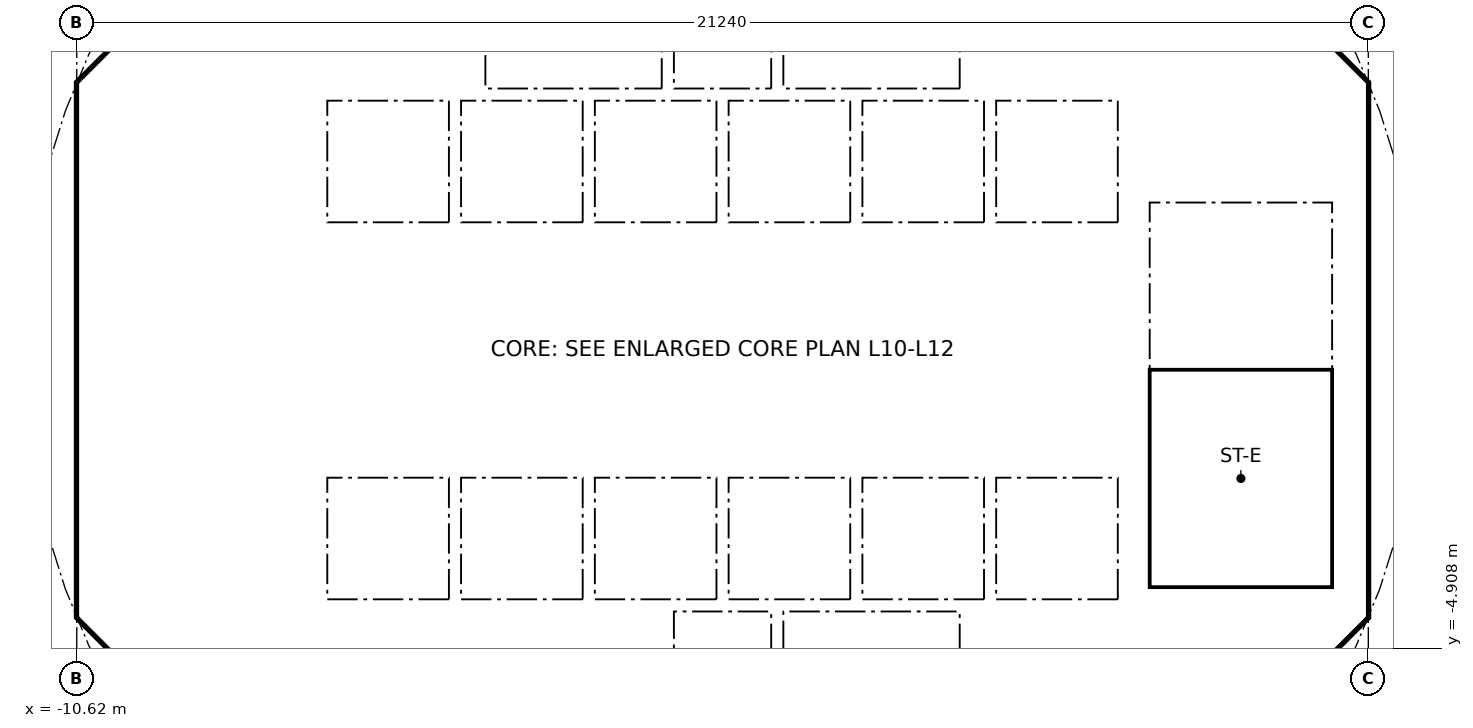
"""IFC4 building model, lengths in metres.
Left out: names, types, materials, properties, quantities, classifications, styles, units other than length and angle.
Written with IfcOpenShell. Run it as: python <this file> out.ifc"""

import sys

from ifc_helpers import new_model, si_unit, direction, frame, frame_2d, origin, place, context, subcontext, project, spatial, polyline, rectangle, outline, extrude, element, fill, save


model = new_model("IFC4")
c1 = context("Model", 3, precision=1e-05, world=origin(), true_north=direction((0.0, 1.0)))
c2 = subcontext(c1, "Body", "Model", "MODEL_VIEW")
j1 = project(units=[si_unit("LENGTHUNIT", "METRE"), si_unit("PLANEANGLEUNIT", "RADIAN")], contexts=[c1])
p1 = place(None, origin())
s1 = spatial("IfcSite", under=j1, at=p1, CompositionType="ELEMENT")
p2 = place(p1, origin())
s2 = spatial("IfcBuilding", under=s1, at=p2, CompositionType="ELEMENT")
p3 = place(p2, frame((0.0, 0.0, 52.9)))
s3 = spatial("IfcBuildingStorey", under=s2, at=p3, CompositionType="ELEMENT", Elevation=52.9)
p4 = place(p3, frame((9.988, 4.613, 0.0), z_axis=(0.0, 0.0, 1.0), x_axis=(-0.707106781187, 0.707106781187, 0.0)))
e1 = element("IfcWall", 1, at=p4, inside=s3, PredefinedType="SHEAR", context=c2, shape_type="SweptSolid", body=[
    extrude(rectangle(XDim=7.602, YDim=0.6, at=frame_2d((3.801, 0.0))), origin(), (0.0, 0.0, 1.0), 3.44),
])
p5 = place(p4, frame((3.201, 0.0, 0.0)))
e2 = element("IfcOpeningElement", 2, at=p5, cuts=e1, PredefinedType="OPENING", context=c2, shape_type="SweptSolid", body=[
    extrude(rectangle(XDim=1.2, YDim=2.1, at=frame_2d((0.6, 1.05))), frame((0.0, 0.31, 0.0), z_axis=(0.0, -1.0, 0.0), x_axis=(1.0, 0.0, 0.0)), (0.0, 0.0, 1.0), 0.62),
])
p6 = place(p3, frame((-4.613, 9.988, 0.0), z_axis=(0.0, 0.0, 1.0), x_axis=(-0.707106781187, -0.707106781187, 0.0)))
e3 = element("IfcWall", 3, at=p6, inside=s3, PredefinedType="SHEAR", context=c2, shape_type="SweptSolid", body=[
    extrude(rectangle(XDim=7.602, YDim=0.6, at=frame_2d((3.801, 0.0))), origin(), (0.0, 0.0, 1.0), 3.44),
])
p7 = place(p6, frame((0.351, 0.0, 0.0)))
e4 = element("IfcOpeningElement", 4, at=p7, cuts=e3, PredefinedType="OPENING", context=c2, shape_type="SweptSolid", body=[
    extrude(rectangle(XDim=1.1, YDim=2.1, at=frame_2d((0.55, 1.05))), frame((0.0, 0.31, 0.0), z_axis=(0.0, -1.0, 0.0), x_axis=(1.0, 0.0, 0.0)), (0.0, 0.0, 1.0), 0.62),
])
p8 = place(p3, frame((-10.325, 3.801, 0.0), z_axis=(0.0, 0.0, 1.0), x_axis=(0.0, -1.0, 0.0)))
e5 = element("IfcWall", 5, at=p8, inside=s3, PredefinedType="SHEAR", context=c2, shape_type="SweptSolid", body=[
    extrude(rectangle(XDim=7.602, YDim=0.6, at=frame_2d((3.801, 0.0))), origin(), (0.0, 0.0, 1.0), 3.44),
])
p9 = place(p8, frame((0.651, 0.0, 0.0)))
e6 = element("IfcOpeningElement", 6, at=p9, cuts=e5, PredefinedType="OPENING", context=c2, shape_type="SweptSolid", body=[
    extrude(rectangle(XDim=1.5, YDim=2.1, at=frame_2d((0.75, 1.05))), frame((0.0, 0.31, 0.0), z_axis=(0.0, -1.0, 0.0), x_axis=(1.0, 0.0, 0.0)), (0.0, 0.0, 1.0), 0.62),
])
p10 = place(p8, frame((5.451, 0.0, 0.0)))
e7 = element("IfcOpeningElement", 7, at=p10, cuts=e5, PredefinedType="OPENING", context=c2, shape_type="SweptSolid", body=[
    extrude(rectangle(XDim=1.5, YDim=2.1, at=frame_2d((0.75, 1.05))), frame((0.0, 0.31, 0.0), z_axis=(0.0, -1.0, 0.0), x_axis=(1.0, 0.0, 0.0)), (0.0, 0.0, 1.0), 0.62),
])
p11 = place(p3, frame((-9.988, -4.613, 0.0), z_axis=(0.0, 0.0, 1.0), x_axis=(0.707106781187, -0.707106781187, 0.0)))
e8 = element("IfcWall", 8, at=p11, inside=s3, PredefinedType="SHEAR", context=c2, shape_type="SweptSolid", body=[
    extrude(rectangle(XDim=7.602, YDim=0.6, at=frame_2d((3.801, 0.0))), origin(), (0.0, 0.0, 1.0), 3.44),
])
p12 = place(p11, frame((6.151, 0.0, 0.0)))
e9 = element("IfcOpeningElement", 9, at=p12, cuts=e8, PredefinedType="OPENING", context=c2, shape_type="SweptSolid", body=[
    extrude(rectangle(XDim=1.1, YDim=2.1, at=frame_2d((0.55, 1.05))), frame((0.0, 0.31, 0.0), z_axis=(0.0, -1.0, 0.0), x_axis=(1.0, 0.0, 0.0)), (0.0, 0.0, 1.0), 0.62),
])
p13 = place(p3, frame((4.613, -9.988, 0.0), z_axis=(0.0, 0.0, 1.0), x_axis=(0.707106781187, 0.707106781187, 0.0)))
e10 = element("IfcWall", 10, at=p13, inside=s3, PredefinedType="SHEAR", context=c2, shape_type="SweptSolid", body=[
    extrude(rectangle(XDim=7.602, YDim=0.6, at=frame_2d((3.801, 0.0))), origin(), (0.0, 0.0, 1.0), 3.44),
])
p14 = place(p13, frame((3.201, 0.0, 0.0)))
e11 = element("IfcOpeningElement", 11, at=p14, cuts=e10, PredefinedType="OPENING", context=c2, shape_type="SweptSolid", body=[
    extrude(rectangle(XDim=1.2, YDim=2.1, at=frame_2d((0.6, 1.05))), frame((0.0, 0.31, 0.0), z_axis=(0.0, -1.0, 0.0), x_axis=(1.0, 0.0, 0.0)), (0.0, 0.0, 1.0), 0.62),
])
p15 = place(p3, frame((-5.8, 4.3, 0.0), z_axis=(0.0, 0.0, 1.0), x_axis=(0.0, 1.0, 0.0)))
e12 = element("IfcWall", 12, at=p15, inside=s3, PredefinedType="PARTITIONING", context=c2, shape_type="SweptSolid", body=[
    extrude(rectangle(XDim=3.927, YDim=0.15, at=frame_2d((1.963, 0.0))), origin(), (0.0, 0.0, 1.0), 3.44),
])
p16 = place(p15, frame((1.551, 0.0, 0.0)))
e13 = element("IfcOpeningElement", 13, at=p16, cuts=e12, PredefinedType="OPENING", context=c2, shape_type="SweptSolid", body=[
    extrude(rectangle(XDim=0.9, YDim=2.1, at=frame_2d((0.45, 1.05))), frame((0.0, 0.085, 0.0), z_axis=(0.0, -1.0, 0.0), x_axis=(1.0, 0.0, 0.0)), (0.0, 0.0, 1.0), 0.17),
])
p17 = place(p3, frame((4.0, 4.3, 0.0), z_axis=(0.0, 0.0, 1.0), x_axis=(0.0, 1.0, 0.0)))
e14 = element("IfcWall", 14, at=p17, inside=s3, PredefinedType="SOLIDWALL", context=c2, shape_type="SweptSolid", body=[
    extrude(rectangle(XDim=2.2, YDim=0.2, at=frame_2d((1.1, 0.0))), origin(), (0.0, 0.0, 1.0), 3.44),
])
p18 = place(p17, frame((0.55, 0.0, 0.0)))
e15 = element("IfcOpeningElement", 15, at=p18, cuts=e14, PredefinedType="OPENING", context=c2, shape_type="SweptSolid", body=[
    extrude(rectangle(XDim=1.1, YDim=2.1, at=frame_2d((0.55, 1.05))), frame((0.0, 0.11, 0.0), z_axis=(0.0, -1.0, 0.0), x_axis=(1.0, 0.0, 0.0)), (0.0, 0.0, 1.0), 0.22),
])
p19 = place(p3, frame((-4.0, 4.3, 0.0), z_axis=(0.0, 0.0, 1.0), x_axis=(0.0, 1.0, 0.0)))
e16 = element("IfcWall", 16, at=p19, inside=s3, PredefinedType="SOLIDWALL", context=c2, shape_type="SweptSolid", body=[
    extrude(rectangle(XDim=2.2, YDim=0.2, at=frame_2d((1.1, 0.0))), origin(), (0.0, 0.0, 1.0), 3.44),
])
p20 = place(p19, frame((0.55, 0.0, 0.0)))
e17 = element("IfcOpeningElement", 17, at=p20, cuts=e16, PredefinedType="OPENING", context=c2, shape_type="SweptSolid", body=[
    extrude(rectangle(XDim=1.1, YDim=2.1, at=frame_2d((0.55, 1.05))), frame((0.0, 0.11, 0.0), z_axis=(0.0, -1.0, 0.0), x_axis=(1.0, 0.0, 0.0)), (0.0, 0.0, 1.0), 0.22),
])
p21 = place(p3, frame((-6.7, 2.0, 0.0), z_axis=(0.0, 0.0, 1.0), x_axis=(1.0, 0.0, 0.0)))
e18 = element("IfcWall", 18, at=p21, inside=s3, PredefinedType="SOLIDWALL", context=c2, shape_type="SweptSolid", body=[
    extrude(rectangle(XDim=13.4, YDim=0.2, at=frame_2d((6.7, 0.0))), origin(), (0.0, 0.0, 1.0), 3.44),
])
p22 = place(p21, frame((0.65, 0.0, 0.0)))
e19 = element("IfcOpeningElement", 19, at=p22, cuts=e18, PredefinedType="OPENING", context=c2, shape_type="SweptSolid", body=[
    extrude(rectangle(XDim=1.1, YDim=2.1, at=frame_2d((0.55, 1.05))), frame((0.0, 0.11, 0.0), z_axis=(0.0, -1.0, 0.0), x_axis=(1.0, 0.0, 0.0)), (0.0, 0.0, 1.0), 0.22),
])
p23 = place(p21, frame((2.85, 0.0, 0.0)))
e20 = element("IfcOpeningElement", 20, at=p23, cuts=e18, PredefinedType="OPENING", context=c2, shape_type="SweptSolid", body=[
    extrude(rectangle(XDim=1.1, YDim=2.1, at=frame_2d((0.55, 1.05))), frame((0.0, 0.11, 0.0), z_axis=(0.0, -1.0, 0.0), x_axis=(1.0, 0.0, 0.0)), (0.0, 0.0, 1.0), 0.22),
])
p24 = place(p21, frame((5.05, 0.0, 0.0)))
e21 = element("IfcOpeningElement", 21, at=p24, cuts=e18, PredefinedType="OPENING", context=c2, shape_type="SweptSolid", body=[
    extrude(rectangle(XDim=1.1, YDim=2.1, at=frame_2d((0.55, 1.05))), frame((0.0, 0.11, 0.0), z_axis=(0.0, -1.0, 0.0), x_axis=(1.0, 0.0, 0.0)), (0.0, 0.0, 1.0), 0.22),
])
p25 = place(p3, frame((6.7, 4.0, 0.0), z_axis=(0.0, 0.0, 1.0), x_axis=(1.0, 0.0, 0.0)))
e22 = element("IfcWall", 22, at=p25, inside=s3, PredefinedType="SOLIDWALL", context=c2, shape_type="SweptSolid", body=[
    extrude(rectangle(XDim=3.325, YDim=0.2, at=frame_2d((1.662, 0.0))), origin(), (0.0, 0.0, 1.0), 3.44),
])
p26 = place(p25, frame((1.25, 0.0, 0.0)))
e23 = element("IfcOpeningElement", 23, at=p26, cuts=e22, PredefinedType="OPENING", context=c2, shape_type="SweptSolid", body=[
    extrude(rectangle(XDim=1.1, YDim=2.1, at=frame_2d((0.55, 1.05))), frame((0.0, 0.11, 0.0), z_axis=(0.0, -1.0, 0.0), x_axis=(1.0, 0.0, 0.0)), (0.0, 0.0, 1.0), 0.22),
])
p27 = place(p3, frame((-6.2, -7.827, 0.0), z_axis=(0.0, 0.0, 1.0), x_axis=(0.0, 1.0, 0.0)))
e24 = element("IfcWall", 24, at=p27, inside=s3, PredefinedType="PARTITIONING", context=c2, shape_type="SweptSolid", body=[
    extrude(rectangle(XDim=3.527, YDim=0.15, at=frame_2d((1.763, 0.0))), origin(), (0.0, 0.0, 1.0), 3.44),
])
p28 = place(p27, frame((1.276, 0.0, 0.0)))
e25 = element("IfcOpeningElement", 25, at=p28, cuts=e24, PredefinedType="OPENING", context=c2, shape_type="SweptSolid", body=[
    extrude(rectangle(XDim=0.9, YDim=2.1, at=frame_2d((0.45, 1.05))), frame((0.0, 0.085, 0.0), z_axis=(0.0, -1.0, 0.0), x_axis=(1.0, 0.0, 0.0)), (0.0, 0.0, 1.0), 0.17),
])
p29 = place(p3, frame((4.0, -6.5, 0.0), z_axis=(0.0, 0.0, 1.0), x_axis=(0.0, 1.0, 0.0)))
e26 = element("IfcWall", 26, at=p29, inside=s3, PredefinedType="SOLIDWALL", context=c2, shape_type="SweptSolid", body=[
    extrude(rectangle(XDim=2.2, YDim=0.2, at=frame_2d((1.1, 0.0))), origin(), (0.0, 0.0, 1.0), 3.44),
])
p30 = place(p29, frame((0.55, 0.0, 0.0)))
e27 = element("IfcOpeningElement", 27, at=p30, cuts=e26, PredefinedType="OPENING", context=c2, shape_type="SweptSolid", body=[
    extrude(rectangle(XDim=1.1, YDim=2.1, at=frame_2d((0.55, 1.05))), frame((0.0, 0.11, 0.0), z_axis=(0.0, -1.0, 0.0), x_axis=(1.0, 0.0, 0.0)), (0.0, 0.0, 1.0), 0.22),
])
p31 = place(p3, frame((-4.0, -6.5, 0.0), z_axis=(0.0, 0.0, 1.0), x_axis=(0.0, 1.0, 0.0)))
e28 = element("IfcWall", 28, at=p31, inside=s3, PredefinedType="SOLIDWALL", context=c2, shape_type="SweptSolid", body=[
    extrude(rectangle(XDim=2.2, YDim=0.2, at=frame_2d((1.1, 0.0))), origin(), (0.0, 0.0, 1.0), 3.44),
])
p32 = place(p31, frame((0.65, 0.0, 0.0)))
e29 = element("IfcOpeningElement", 29, at=p32, cuts=e28, PredefinedType="OPENING", context=c2, shape_type="SweptSolid", body=[
    extrude(rectangle(XDim=0.9, YDim=2.1, at=frame_2d((0.45, 1.05))), frame((0.0, 0.11, 0.0), z_axis=(0.0, -1.0, 0.0), x_axis=(1.0, 0.0, 0.0)), (0.0, 0.0, 1.0), 0.22),
])
p33 = place(p3, frame((-6.7, -2.0, 0.0), z_axis=(0.0, 0.0, 1.0), x_axis=(1.0, 0.0, 0.0)))
e30 = element("IfcWall", 30, at=p33, inside=s3, PredefinedType="SOLIDWALL", context=c2, shape_type="SweptSolid", body=[
    extrude(rectangle(XDim=13.4, YDim=0.2, at=frame_2d((6.7, 0.0))), origin(), (0.0, 0.0, 1.0), 3.44),
])
p34 = place(p33, frame((0.65, 0.0, 0.0)))
e31 = element("IfcOpeningElement", 31, at=p34, cuts=e30, PredefinedType="OPENING", context=c2, shape_type="SweptSolid", body=[
    extrude(rectangle(XDim=1.1, YDim=2.1, at=frame_2d((0.55, 1.05))), frame((0.0, 0.11, 0.0), z_axis=(0.0, -1.0, 0.0), x_axis=(1.0, 0.0, 0.0)), (0.0, 0.0, 1.0), 0.22),
])
p35 = place(p33, frame((2.85, 0.0, 0.0)))
e32 = element("IfcOpeningElement", 32, at=p35, cuts=e30, PredefinedType="OPENING", context=c2, shape_type="SweptSolid", body=[
    extrude(rectangle(XDim=1.1, YDim=2.1, at=frame_2d((0.55, 1.05))), frame((0.0, 0.11, 0.0), z_axis=(0.0, -1.0, 0.0), x_axis=(1.0, 0.0, 0.0)), (0.0, 0.0, 1.0), 0.22),
])
p36 = place(p3, origin())
e33 = element("IfcWall", 33, at=p36, inside=s3, PredefinedType="SHEAR", context=c2, shape_type="SweptSolid", body=[
    extrude(outline(polyline([(-10.625, -3.801), (-10.025, -3.801), (-10.025, -4.152), (-9.776, -4.401), (-10.2, -4.825), (-10.625, -4.401), (-10.625, -3.801)])), origin(), (0.0, 0.0, 1.0), 3.44),
])
p37 = place(p3, origin())
e34 = element("IfcWall", 34, at=p37, inside=s3, PredefinedType="SHEAR", context=c2, shape_type="SweptSolid", body=[
    extrude(outline(polyline([(-10.2, 4.825), (-9.776, 4.401), (-10.025, 4.152), (-10.025, 3.801), (-10.625, 3.801), (-10.625, 4.401), (-10.2, 4.825)])), origin(), (0.0, 0.0, 1.0), 3.44),
])
p38 = place(p3, origin())
e35 = element("IfcWall", 35, at=p38, inside=s3, PredefinedType="SHEAR", context=c2, shape_type="SweptSolid", body=[
    extrude(outline(polyline([(9.776, -4.401), (10.025, -4.152), (10.025, -3.801), (10.025, 4.152), (9.776, 4.401), (10.2, 4.825), (10.625, 4.401), (10.625, -4.401), (10.2, -4.825), (9.776, -4.401)])), origin(), (0.0, 0.0, 1.0), 3.44),
])
for number, where, z_axis, x_axis in (
    (36, (-0.9, -6.5, 0.0), (0.0, 0.0, 1.0), (0.0, 1.0, 0.0)),
    (37, (0.9, -6.5, 0.0), (0.0, 0.0, 1.0), (0.0, 1.0, 0.0)),
):
    element("IfcWall", number, at=place(p3, frame(where, z_axis=z_axis, x_axis=x_axis)), inside=s3, PredefinedType="SOLIDWALL", context=c2, shape_type="SweptSolid", body=[
        extrude(rectangle(XDim=2.2, YDim=0.2, at=frame_2d((1.1, 0.0))), origin(), (0.0, 0.0, 1.0), 3.44),
    ])
p39 = place(p3, origin())
e38 = element("IfcWall", 38, at=p39, inside=s3, PredefinedType="SOLIDWALL", context=c2, shape_type="SweptSolid", body=[
    extrude(outline(polyline([(-6.7, -2.1), (-6.5, -2.1), (-6.5, -4.1), (-4.5, -4.1), (-4.5, -2.1), (-4.3, -2.1), (-4.3, -4.1), (-2.3, -4.1), (-2.3, -2.1), (-2.1, -2.1), (-2.1, -4.1), (-0.1, -4.1), (-0.1, -2.1), (0.1, -2.1), (0.1, -4.1), (2.1, -4.1), (2.1, -2.1), (2.3, -2.1), (2.3, -4.1), (4.3, -4.1), (4.3, -2.1), (4.5, -2.1), (4.5, -4.1), (6.5, -4.1), (6.5, -2.1), (6.7, -2.1), (6.7, -4.3), (-6.7, -4.3), (-6.7, -2.1)])), origin(), (0.0, 0.0, 1.0), 3.44),
])
for number, where, z_axis, x_axis in (
    (39, (-0.9, 4.3, 0.0), (0.0, 0.0, 1.0), (0.0, 1.0, 0.0)),
    (40, (0.9, 4.3, 0.0), (0.0, 0.0, 1.0), (0.0, 1.0, 0.0)),
):
    element("IfcWall", number, at=place(p3, frame(where, z_axis=z_axis, x_axis=x_axis)), inside=s3, PredefinedType="SOLIDWALL", context=c2, shape_type="SweptSolid", body=[
        extrude(rectangle(XDim=2.2, YDim=0.2, at=frame_2d((1.1, 0.0))), origin(), (0.0, 0.0, 1.0), 3.44),
    ])
p40 = place(p3, origin())
e41 = element("IfcWall", 41, at=p40, inside=s3, PredefinedType="SOLIDWALL", context=c2, shape_type="SweptSolid", body=[
    extrude(outline(polyline([(-6.5, 2.1), (-6.7, 2.1), (-6.7, 4.3), (6.7, 4.3), (6.7, 2.1), (6.5, 2.1), (6.5, 4.1), (4.5, 4.1), (4.5, 2.1), (4.3, 2.1), (4.3, 4.1), (2.3, 4.1), (2.3, 2.1), (2.1, 2.1), (2.1, 4.1), (0.1, 4.1), (0.1, 2.1), (-0.1, 2.1), (-0.1, 4.1), (-2.1, 4.1), (-2.1, 2.1), (-2.3, 2.1), (-2.3, 4.1), (-4.3, 4.1), (-4.3, 2.1), (-4.5, 2.1), (-4.5, 4.1), (-6.5, 4.1), (-6.5, 2.1)])), origin(), (0.0, 0.0, 1.0), 3.44),
])
for number, where, z_axis, x_axis in (
    (42, (-10.025, -4.0, 0.0), (0.0, 0.0, 1.0), (1.0, 0.0, 0.0)),
    (43, (-10.025, 4.0, 0.0), (0.0, 0.0, 1.0), (1.0, 0.0, 0.0)),
):
    element("IfcWall", number, at=place(p3, frame(where, z_axis=z_axis, x_axis=x_axis)), inside=s3, PredefinedType="PARTITIONING", context=c2, shape_type="SweptSolid", body=[
        extrude(rectangle(XDim=3.325, YDim=0.2, at=frame_2d((1.662, 0.0))), origin(), (0.0, 0.0, 1.0), 3.44),
    ])
p41 = place(p3, origin())
e44 = element("IfcWall", 44, at=p41, inside=s3, PredefinedType="SOLIDWALL", context=c2, shape_type="SweptSolid", body=[
    extrude(outline(polyline([(7.025, -3.9), (6.7, -3.9), (6.7, 3.9), (7.025, 3.9), (7.025, -3.9)])), origin(), (0.0, 0.0, 1.0), 3.44),
])
p42 = place(p3, origin())
e45 = element("IfcWall", 45, at=p42, inside=s3, PredefinedType="SOLIDWALL", context=c2, shape_type="SweptSolid", body=[
    extrude(outline(polyline([(10.025, -4.1), (6.7, -4.1), (6.7, -3.9), (10.025, -3.9), (10.025, -4.1)])), origin(), (0.0, 0.0, 1.0), 3.44),
])
p43 = place(p22, origin())
e46 = element("IfcDoor", 46, at=p43, inside=s3, OperationType="DOUBLE_DOOR_SLIDING", PredefinedType="DOOR", context=c2, shape_type="SweptSolid", body=[
    extrude(rectangle(XDim=1.1, YDim=2.1, at=frame_2d((0.55, 1.05))), frame((0.0, 0.025, 0.0), z_axis=(0.0, -1.0, 0.0), x_axis=(1.0, 0.0, 0.0)), (0.0, 0.0, 1.0), 0.05),
])
fill(e19, e46)
p44 = place(p23, origin())
e47 = element("IfcDoor", 47, at=p44, inside=s3, OperationType="DOUBLE_DOOR_SLIDING", PredefinedType="DOOR", context=c2, shape_type="SweptSolid", body=[
    extrude(rectangle(XDim=1.1, YDim=2.1, at=frame_2d((0.55, 1.05))), frame((0.0, 0.025, 0.0), z_axis=(0.0, -1.0, 0.0), x_axis=(1.0, 0.0, 0.0)), (0.0, 0.0, 1.0), 0.05),
])
fill(e20, e47)
p45 = place(p24, origin())
e48 = element("IfcDoor", 48, at=p45, inside=s3, OperationType="DOUBLE_DOOR_SLIDING", PredefinedType="DOOR", context=c2, shape_type="SweptSolid", body=[
    extrude(rectangle(XDim=1.1, YDim=2.1, at=frame_2d((0.55, 1.05))), frame((0.0, 0.025, 0.0), z_axis=(0.0, -1.0, 0.0), x_axis=(1.0, 0.0, 0.0)), (0.0, 0.0, 1.0), 0.05),
])
fill(e21, e48)
p46 = place(p34, origin())
e49 = element("IfcDoor", 49, at=p46, inside=s3, OperationType="DOUBLE_DOOR_SLIDING", PredefinedType="DOOR", context=c2, shape_type="SweptSolid", body=[
    extrude(rectangle(XDim=1.1, YDim=2.1, at=frame_2d((0.55, 1.05))), frame((0.0, 0.025, 0.0), z_axis=(0.0, -1.0, 0.0), x_axis=(1.0, 0.0, 0.0)), (0.0, 0.0, 1.0), 0.05),
])
fill(e31, e49)
p47 = place(p35, origin())
e50 = element("IfcDoor", 50, at=p47, inside=s3, OperationType="DOUBLE_DOOR_SLIDING", PredefinedType="DOOR", context=c2, shape_type="SweptSolid", body=[
    extrude(rectangle(XDim=1.1, YDim=2.1, at=frame_2d((0.55, 1.05))), frame((0.0, 0.025, 0.0), z_axis=(0.0, -1.0, 0.0), x_axis=(1.0, 0.0, 0.0)), (0.0, 0.0, 1.0), 0.05),
])
fill(e32, e50)
p48 = place(p18, origin())
e51 = element("IfcDoor", 51, at=p48, inside=s3, OperationType="DOUBLE_DOOR_SLIDING", PredefinedType="DOOR", context=c2, shape_type="SweptSolid", body=[
    extrude(rectangle(XDim=1.1, YDim=2.1, at=frame_2d((0.55, 1.05))), frame((0.0, 0.025, 0.0), z_axis=(0.0, -1.0, 0.0), x_axis=(1.0, 0.0, 0.0)), (0.0, 0.0, 1.0), 0.05),
])
fill(e15, e51)
p49 = place(p30, origin())
e52 = element("IfcDoor", 52, at=p49, inside=s3, OperationType="DOUBLE_DOOR_SLIDING", PredefinedType="DOOR", context=c2, shape_type="SweptSolid", body=[
    extrude(rectangle(XDim=1.1, YDim=2.1, at=frame_2d((0.55, 1.05))), frame((0.0, 0.025, 0.0), z_axis=(0.0, -1.0, 0.0), x_axis=(1.0, 0.0, 0.0)), (0.0, 0.0, 1.0), 0.05),
])
fill(e27, e52)
p50 = place(p20, origin())
e53 = element("IfcDoor", 53, at=p50, inside=s3, OperationType="DOUBLE_DOOR_SLIDING", PredefinedType="DOOR", context=c2, shape_type="SweptSolid", body=[
    extrude(rectangle(XDim=1.1, YDim=2.1, at=frame_2d((0.55, 1.05))), frame((0.0, 0.025, 0.0), z_axis=(0.0, -1.0, 0.0), x_axis=(1.0, 0.0, 0.0)), (0.0, 0.0, 1.0), 0.05),
])
fill(e17, e53)
p51 = place(p26, frame((1.1, 0.0, 0.0), x_axis=(-1.0, 0.0, 0.0)))
e54 = element("IfcDoor", 54, at=p51, inside=s3, OperationType="SINGLE_SWING_LEFT", PredefinedType="DOOR", context=c2, shape_type="SweptSolid", body=[
    extrude(rectangle(XDim=1.1, YDim=2.1, at=frame_2d((0.55, 1.05))), frame((0.0, 0.025, 0.0), z_axis=(0.0, -1.0, 0.0), x_axis=(1.0, 0.0, 0.0)), (0.0, 0.0, 1.0), 0.05),
])
fill(e23, e54)
p52 = place(p9, origin())
e55 = element("IfcDoor", 55, at=p52, inside=s3, OperationType="DOUBLE_DOOR_SINGLE_SWING", PredefinedType="DOOR", context=c2, shape_type="SweptSolid", body=[
    extrude(rectangle(XDim=1.5, YDim=2.1, at=frame_2d((0.75, 1.05))), frame((0.0, 0.025, 0.0), z_axis=(0.0, -1.0, 0.0), x_axis=(1.0, 0.0, 0.0)), (0.0, 0.0, 1.0), 0.05),
])
fill(e6, e55)
p53 = place(p10, origin())
e56 = element("IfcDoor", 56, at=p53, inside=s3, OperationType="DOUBLE_DOOR_SINGLE_SWING", PredefinedType="DOOR", context=c2, shape_type="SweptSolid", body=[
    extrude(rectangle(XDim=1.5, YDim=2.1, at=frame_2d((0.75, 1.05))), frame((0.0, 0.025, 0.0), z_axis=(0.0, -1.0, 0.0), x_axis=(1.0, 0.0, 0.0)), (0.0, 0.0, 1.0), 0.05),
])
fill(e7, e56)
save(model, sys.argv[1])
